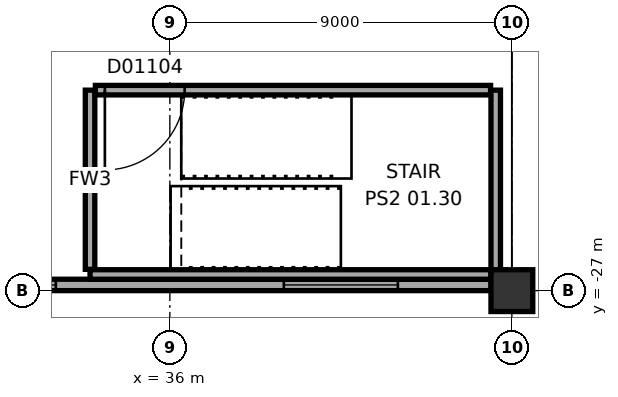
"""IFC4 building model, lengths in metres.
Left out: names, types, materials, properties, quantities, classifications, styles, units other than length and angle.
Written with IfcOpenShell. Run it as: python <this file> out.ifc"""

import sys

from ifc_helpers import new_model, si_unit, direction, frame, frame_2d, origin, origin_2d, place, context, subcontext, project, spatial, rectangle, extrude, element, fill, save


model = new_model("IFC4")
c1 = context("Model", 3, precision=1e-05, world=origin(), true_north=direction((0.0, 1.0)))
c2 = subcontext(c1, "Body", "Model", "MODEL_VIEW")
j1 = project(units=[si_unit("LENGTHUNIT", "METRE"), si_unit("PLANEANGLEUNIT", "RADIAN")], contexts=[c1])
p1 = place(None, origin())
s1 = spatial("IfcSite", under=j1, at=p1, CompositionType="ELEMENT")
p2 = place(p1, origin())
s2 = spatial("IfcBuilding", under=s1, at=p2, CompositionType="ELEMENT")
p3 = place(p2, frame((0.0, 0.0, 7.5)))
s3 = spatial("IfcBuildingStorey", under=s2, at=p3, CompositionType="ELEMENT", Elevation=7.5)
p4 = place(p3, frame((45.0, -27.0, 0.0), z_axis=(0.0, 0.0, 1.0), x_axis=(1.0, 0.0, 0.0)))
e1 = element("IfcColumn", 1, at=p4, inside=s3, PredefinedType="COLUMN", context=c2, shape_type="SweptSolid", body=[
    extrude(rectangle(XDim=1.1, YDim=1.1, at=origin_2d()), origin(), (0.0, 0.0, 1.0), 5.5),
])
p5 = place(p3, frame((27.55, -26.85, 0.0), z_axis=(0.0, 0.0, 1.0), x_axis=(1.0, 0.0, 0.0)))
e2 = element("IfcWall", 2, at=p5, inside=s3, PredefinedType="STANDARD", context=c2, shape_type="SweptSolid", body=[
    extrude(rectangle(XDim=16.9, YDim=0.3, at=frame_2d((8.45, 0.0))), origin(), (0.0, 0.0, 1.0), 4.0),
])
p6 = place(p5, frame((2.45, 0.0, 1.0)))
e3 = element("IfcOpeningElement", 3, at=p6, cuts=e2, PredefinedType="OPENING", context=c2, shape_type="SweptSolid", body=[
    extrude(rectangle(XDim=3.0, YDim=2.6, at=frame_2d((1.5, 1.3))), frame((0.0, 0.16, 0.0), z_axis=(0.0, -1.0, 0.0), x_axis=(1.0, 0.0, 0.0)), (0.0, 0.0, 1.0), 0.32),
])
p7 = place(p5, frame((11.45, 0.0, 1.0)))
e4 = element("IfcOpeningElement", 4, at=p7, cuts=e2, PredefinedType="OPENING", context=c2, shape_type="SweptSolid", body=[
    extrude(rectangle(XDim=3.0, YDim=2.6, at=frame_2d((1.5, 1.3))), frame((0.0, 0.16, 0.0), z_axis=(0.0, -1.0, 0.0), x_axis=(1.0, 0.0, 0.0)), (0.0, 0.0, 1.0), 0.32),
])
p8 = place(p3, frame((33.9, -26.44, 0.0), z_axis=(0.0, 0.0, 1.0), x_axis=(0.0, 1.0, 0.0)))
e5 = element("IfcWall", 5, at=p8, inside=s3, PredefinedType="SOLIDWALL", context=c2, shape_type="SweptSolid", body=[
    extrude(rectangle(XDim=4.715, YDim=0.25, at=frame_2d((2.357, 0.0))), origin(), (0.0, 0.0, 1.0), 5.2),
])
p9 = place(p3, frame((34.04, -21.725, 0.0), z_axis=(0.0, 0.0, 1.0), x_axis=(1.0, 0.0, 0.0)))
e6 = element("IfcWall", 6, at=p9, inside=s3, PredefinedType="SOLIDWALL", context=c2, shape_type="SweptSolid", body=[
    extrude(rectangle(XDim=10.4, YDim=0.25, at=frame_2d((5.2, 0.0))), origin(), (0.0, 0.0, 1.0), 5.2),
])
p10 = place(p9, frame((0.25, 0.0, 0.0)))
e7 = element("IfcOpeningElement", 7, at=p10, cuts=e6, PredefinedType="OPENING", context=c2, shape_type="SweptSolid", body=[
    extrude(rectangle(XDim=2.1, YDim=2.4, at=frame_2d((1.05, 1.2))), frame((0.0, 0.135, 0.0), z_axis=(0.0, -1.0, 0.0), x_axis=(1.0, 0.0, 0.0)), (0.0, 0.0, 1.0), 0.27),
])
p11 = place(p3, frame((44.575, -21.725, 0.0), z_axis=(0.0, 0.0, 1.0), x_axis=(0.0, -1.0, 0.0)))
e8 = element("IfcWall", 8, at=p11, inside=s3, PredefinedType="SOLIDWALL", context=c2, shape_type="SweptSolid", body=[
    extrude(rectangle(XDim=4.975, YDim=0.25, at=frame_2d((2.487, 0.0))), origin(), (0.0, 0.0, 1.0), 5.2),
])
p12 = place(p3, frame((44.45, -26.575, 0.0), z_axis=(0.0, 0.0, 1.0), x_axis=(-1.0, 0.0, 0.0)))
e9 = element("IfcWall", 9, at=p12, inside=s3, PredefinedType="SOLIDWALL", context=c2, shape_type="SweptSolid", body=[
    extrude(rectangle(XDim=10.55, YDim=0.25, at=frame_2d((5.275, 0.0))), origin(), (0.0, 0.0, 1.0), 5.2),
])
p13 = place(p6, origin())
e10 = element("IfcWindow", 10, at=p13, inside=s3, PartitioningType="SINGLE_PANEL", PredefinedType="WINDOW", context=c2, shape_type="SweptSolid", body=[
    extrude(rectangle(XDim=3.0, YDim=2.6, at=frame_2d((1.5, 1.3))), frame((0.0, 0.03, 0.0), z_axis=(0.0, -1.0, 0.0), x_axis=(1.0, 0.0, 0.0)), (0.0, 0.0, 1.0), 0.06),
])
fill(e3, e10)
p14 = place(p7, origin())
e11 = element("IfcWindow", 11, at=p14, inside=s3, PartitioningType="SINGLE_PANEL", PredefinedType="WINDOW", context=c2, shape_type="SweptSolid", body=[
    extrude(rectangle(XDim=3.0, YDim=2.6, at=frame_2d((1.5, 1.3))), frame((0.0, 0.03, 0.0), z_axis=(0.0, -1.0, 0.0), x_axis=(1.0, 0.0, 0.0)), (0.0, 0.0, 1.0), 0.06),
])
fill(e4, e11)
p15 = place(p10, frame((2.1, 0.0, 0.0), z_axis=(0.0, 0.0, 1.0), x_axis=(-1.0, 0.0, 0.0)))
e12 = element("IfcDoor", 12, at=p15, inside=s3, OperationType="DOUBLE_DOOR_SINGLE_SWING", PredefinedType="DOOR", context=c2, shape_type="SweptSolid", body=[
    extrude(rectangle(XDim=2.1, YDim=2.4, at=frame_2d((1.05, 1.2))), frame((0.0, 0.025, 0.0), z_axis=(0.0, -1.0, 0.0), x_axis=(1.0, 0.0, 0.0)), (0.0, 0.0, 1.0), 0.05),
])
fill(e7, e12)
save(model, sys.argv[1])
